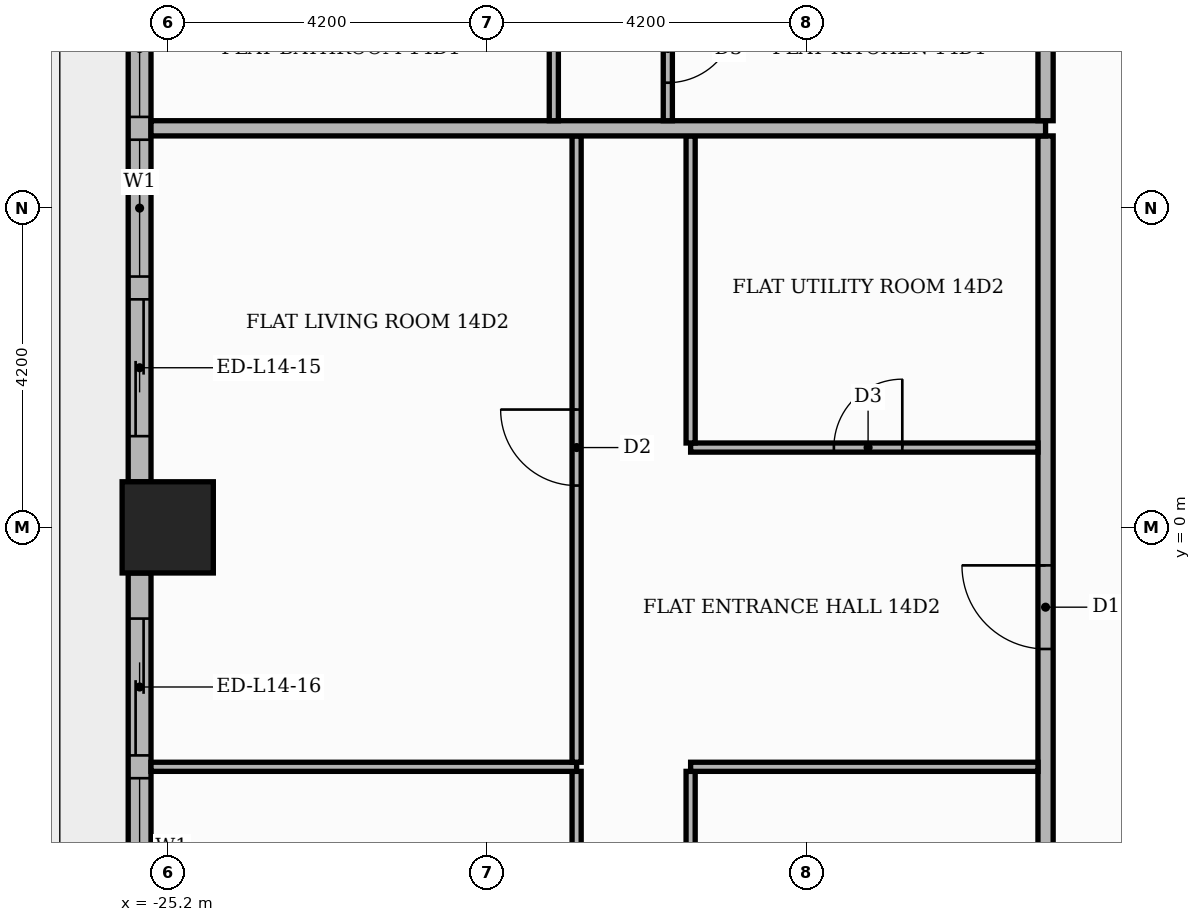
"""IFC4 building model, lengths in metres.
Left out: names, types, materials, properties, quantities, classifications, styles, units other than length and angle.
Written with IfcOpenShell. Run it as: python <this file> out.ifc"""

import sys

from ifc_helpers import new_model, si_unit, direction, frame, frame_2d, origin, origin_2d, place, context, subcontext, project, spatial, rectangle, extrude, element, fill, save


model = new_model("IFC4")
c1 = context("Model", 3, precision=1e-05, world=origin(), true_north=direction((0.0, 1.0)))
c2 = subcontext(c1, "Body", "Model", "MODEL_VIEW")
j1 = project(units=[si_unit("LENGTHUNIT", "METRE"), si_unit("PLANEANGLEUNIT", "RADIAN")], contexts=[c1])
p1 = place(None, origin())
s1 = spatial("IfcSite", under=j1, at=p1, CompositionType="ELEMENT")
p2 = place(p1, origin())
s2 = spatial("IfcBuilding", under=s1, at=p2, CompositionType="ELEMENT")
p3 = place(p2, frame((0.0, 0.0, 62.1)))
s3 = spatial("IfcBuildingStorey", under=s2, at=p3, CompositionType="ELEMENT", Elevation=62.1)
p4 = place(p3, frame((-25.2, 0.0, 0.0), z_axis=(0.0, 0.0, 1.0), x_axis=(1.0, 0.0, 0.0)))
e1 = element("IfcColumn", 1, at=p4, inside=s3, PredefinedType="COLUMN", context=c2, shape_type="SweptSolid", body=[
    extrude(rectangle(XDim=1.2, YDim=1.2, at=origin_2d()), origin(), (0.0, 0.0, 1.0), 3.9),
])
p5 = place(p3, frame((-25.57, 7.8, 0.0), z_axis=(0.0, 0.0, 1.0), x_axis=(0.0, -1.0, 0.0)))
e2 = element("IfcWall", 2, at=p5, inside=s3, PredefinedType="STANDARD", context=c2, shape_type="SweptSolid", body=[
    extrude(rectangle(XDim=7.2, YDim=0.3, at=frame_2d((3.6, 0.0))), origin(), (0.0, 0.0, 1.0), 3.48),
])
p6 = place(p5, frame((0.6, 0.0, 0.9)))
e3 = element("IfcOpeningElement", 3, at=p6, cuts=e2, PredefinedType="OPENING", context=c2, shape_type="SweptSolid", body=[
    extrude(rectangle(XDim=1.8, YDim=2.1, at=frame_2d((0.9, 1.05))), frame((0.0, 0.16, 0.0), z_axis=(0.0, -1.0, 0.0), x_axis=(1.0, 0.0, 0.0)), (0.0, 0.0, 1.0), 0.32),
])
p7 = place(p5, frame((2.7, 0.0, 0.9)))
e4 = element("IfcOpeningElement", 4, at=p7, cuts=e2, PredefinedType="OPENING", context=c2, shape_type="SweptSolid", body=[
    extrude(rectangle(XDim=1.8, YDim=2.1, at=frame_2d((0.9, 1.05))), frame((0.0, 0.16, 0.0), z_axis=(0.0, -1.0, 0.0), x_axis=(1.0, 0.0, 0.0)), (0.0, 0.0, 1.0), 0.32),
])
p8 = place(p5, frame((4.8, 0.0, 0.0)))
e5 = element("IfcOpeningElement", 5, at=p8, cuts=e2, PredefinedType="OPENING", context=c2, shape_type="SweptSolid", body=[
    extrude(rectangle(XDim=1.8, YDim=2.4, at=frame_2d((0.9, 1.2))), frame((0.0, 0.16, 0.0), z_axis=(0.0, -1.0, 0.0), x_axis=(1.0, 0.0, 0.0)), (0.0, 0.0, 1.0), 0.32),
])
p9 = place(p3, frame((-25.57, -0.6, 0.0), z_axis=(0.0, 0.0, 1.0), x_axis=(0.0, -1.0, 0.0)))
e6 = element("IfcWall", 6, at=p9, inside=s3, PredefinedType="STANDARD", context=c2, shape_type="SweptSolid", body=[
    extrude(rectangle(XDim=7.2, YDim=0.3, at=frame_2d((3.6, 0.0))), origin(), (0.0, 0.0, 1.0), 3.48),
])
p10 = place(p9, frame((0.6, 0.0, 0.0)))
e7 = element("IfcOpeningElement", 7, at=p10, cuts=e6, PredefinedType="OPENING", context=c2, shape_type="SweptSolid", body=[
    extrude(rectangle(XDim=1.8, YDim=2.4, at=frame_2d((0.9, 1.2))), frame((0.0, 0.16, 0.0), z_axis=(0.0, -1.0, 0.0), x_axis=(1.0, 0.0, 0.0)), (0.0, 0.0, 1.0), 0.32),
])
p11 = place(p9, frame((2.7, 0.0, 0.9)))
e8 = element("IfcOpeningElement", 8, at=p11, cuts=e6, PredefinedType="OPENING", context=c2, shape_type="SweptSolid", body=[
    extrude(rectangle(XDim=1.8, YDim=2.1, at=frame_2d((0.9, 1.05))), frame((0.0, 0.16, 0.0), z_axis=(0.0, -1.0, 0.0), x_axis=(1.0, 0.0, 0.0)), (0.0, 0.0, 1.0), 0.32),
])
p12 = place(p9, frame((4.8, 0.0, 0.0)))
e9 = element("IfcOpeningElement", 9, at=p12, cuts=e6, PredefinedType="OPENING", context=c2, shape_type="SweptSolid", body=[
    extrude(rectangle(XDim=1.8, YDim=2.4, at=frame_2d((0.9, 1.2))), frame((0.0, 0.16, 0.0), z_axis=(0.0, -1.0, 0.0), x_axis=(1.0, 0.0, 0.0)), (0.0, 0.0, 1.0), 0.32),
])
p13 = place(p3, frame((-13.65, -13.55, 0.0), z_axis=(0.0, 0.0, 1.0), x_axis=(0.0, 1.0, 0.0)))
e10 = element("IfcWall", 10, at=p13, inside=s3, PredefinedType="PARTITIONING", context=c2, shape_type="SweptSolid", body=[
    extrude(rectangle(XDim=18.7, YDim=0.2, at=frame_2d((9.35, 0.0))), origin(), (0.0, 0.0, 1.0), 3.48),
])
p14 = place(p13, frame((11.95, 0.0, 0.0)))
e11 = element("IfcOpeningElement", 11, at=p14, cuts=e10, PredefinedType="OPENING", context=c2, shape_type="SweptSolid", body=[
    extrude(rectangle(XDim=1.1, YDim=2.4, at=frame_2d((0.55, 1.2))), frame((0.0, 0.11, 0.0), z_axis=(0.0, -1.0, 0.0), x_axis=(1.0, 0.0, 0.0)), (0.0, 0.0, 1.0), 0.22),
])
p15 = place(p3, frame((-19.82, -9.39, 0.0), z_axis=(0.0, 0.0, 1.0), x_axis=(0.0, 1.0, 0.0)))
e12 = element("IfcWall", 12, at=p15, inside=s3, PredefinedType="PARTITIONING", context=c2, shape_type="SweptSolid", body=[
    extrude(rectangle(XDim=6.18, YDim=0.12, at=frame_2d((3.09, 0.0))), origin(), (0.0, 0.0, 1.0), 3.48),
])
p16 = place(p15, frame((2.64, 0.0, 0.0)))
e13 = element("IfcOpeningElement", 13, at=p16, cuts=e12, PredefinedType="OPENING", context=c2, shape_type="SweptSolid", body=[
    extrude(rectangle(XDim=0.9, YDim=2.1, at=frame_2d((0.45, 1.05))), frame((0.0, 0.07, 0.0), z_axis=(0.0, -1.0, 0.0), x_axis=(1.0, 0.0, 0.0)), (0.0, 0.0, 1.0), 0.14),
])
p17 = place(p3, frame((-18.32, -8.94, 0.0), z_axis=(0.0, 0.0, 1.0), x_axis=(0.0, 1.0, 0.0)))
e14 = element("IfcWall", 14, at=p17, inside=s3, PredefinedType="PARTITIONING", context=c2, shape_type="SweptSolid", body=[
    extrude(rectangle(XDim=5.73, YDim=0.12, at=frame_2d((2.865, 0.0))), origin(), (0.0, 0.0, 1.0), 3.48),
])
p18 = place(p17, frame((2.415, 0.0, 0.0)))
e15 = element("IfcOpeningElement", 15, at=p18, cuts=e14, PredefinedType="OPENING", context=c2, shape_type="SweptSolid", body=[
    extrude(rectangle(XDim=0.9, YDim=2.1, at=frame_2d((0.45, 1.05))), frame((0.0, 0.07, 0.0), z_axis=(0.0, -1.0, 0.0), x_axis=(1.0, 0.0, 0.0)), (0.0, 0.0, 1.0), 0.14),
])
p19 = place(p3, frame((-25.42, -3.15, 0.0), z_axis=(0.0, 0.0, 1.0), x_axis=(1.0, 0.0, 0.0)))
e16 = element("IfcWall", 16, at=p19, inside=s3, PredefinedType="PARTITIONING", context=c2, shape_type="SweptSolid", body=[
    extrude(rectangle(XDim=5.6, YDim=0.12, at=frame_2d((2.8, 0.0))), origin(), (0.0, 0.0, 1.0), 3.48),
])
p20 = place(p3, frame((-18.32, -3.15, 0.0), z_axis=(0.0, 0.0, 1.0), x_axis=(1.0, 0.0, 0.0)))
e17 = element("IfcWall", 17, at=p20, inside=s3, PredefinedType="PARTITIONING", context=c2, shape_type="SweptSolid", body=[
    extrude(rectangle(XDim=4.57, YDim=0.12, at=frame_2d((2.285, 0.0))), origin(), (0.0, 0.0, 1.0), 3.48),
])
p21 = place(p3, frame((-19.82, -3.09, 0.0), z_axis=(0.0, 0.0, 1.0), x_axis=(0.0, 1.0, 0.0)))
e18 = element("IfcWall", 18, at=p21, inside=s3, PredefinedType="PARTITIONING", context=c2, shape_type="SweptSolid", body=[
    extrude(rectangle(XDim=8.24, YDim=0.12, at=frame_2d((4.12, 0.0))), origin(), (0.0, 0.0, 1.0), 3.48),
])
p22 = place(p21, frame((3.64, 0.0, 0.0)))
e19 = element("IfcOpeningElement", 19, at=p22, cuts=e18, PredefinedType="OPENING", context=c2, shape_type="SweptSolid", body=[
    extrude(rectangle(XDim=1.0, YDim=2.1, at=frame_2d((0.5, 1.05))), frame((0.0, 0.07, 0.0), z_axis=(0.0, -1.0, 0.0), x_axis=(1.0, 0.0, 0.0)), (0.0, 0.0, 1.0), 0.14),
])
p23 = place(p3, frame((-18.32, 1.05, 0.0), z_axis=(0.0, 0.0, 1.0), x_axis=(1.0, 0.0, 0.0)))
e20 = element("IfcWall", 20, at=p23, inside=s3, PredefinedType="PARTITIONING", context=c2, shape_type="SweptSolid", body=[
    extrude(rectangle(XDim=4.57, YDim=0.12, at=frame_2d((2.285, 0.0))), origin(), (0.0, 0.0, 1.0), 3.48),
])
p24 = place(p23, frame((1.885, 0.0, 0.0)))
e21 = element("IfcOpeningElement", 21, at=p24, cuts=e20, PredefinedType="OPENING", context=c2, shape_type="SweptSolid", body=[
    extrude(rectangle(XDim=0.9, YDim=2.1, at=frame_2d((0.45, 1.05))), frame((0.0, 0.07, 0.0), z_axis=(0.0, -1.0, 0.0), x_axis=(1.0, 0.0, 0.0)), (0.0, 0.0, 1.0), 0.14),
])
p25 = place(p3, frame((-18.32, 1.11, 0.0), z_axis=(0.0, 0.0, 1.0), x_axis=(0.0, 1.0, 0.0)))
e22 = element("IfcWall", 22, at=p25, inside=s3, PredefinedType="PARTITIONING", context=c2, shape_type="SweptSolid", body=[
    extrude(rectangle(XDim=4.04, YDim=0.12, at=frame_2d((2.02, 0.0))), origin(), (0.0, 0.0, 1.0), 3.48),
])
p26 = place(p3, frame((-25.42, 5.25, 0.0), z_axis=(0.0, 0.0, 1.0), x_axis=(1.0, 0.0, 0.0)))
e23 = element("IfcWall", 23, at=p26, inside=s3, PredefinedType="PARTITIONING", context=c2, shape_type="SweptSolid", body=[
    extrude(rectangle(XDim=11.77, YDim=0.2, at=frame_2d((5.885, 0.0))), origin(), (0.0, 0.0, 1.0), 3.48),
])
p27 = place(p3, frame((-20.12, 5.35, 0.0), z_axis=(0.0, 0.0, 1.0), x_axis=(0.0, 1.0, 0.0)))
e24 = element("IfcWall", 24, at=p27, inside=s3, PredefinedType="PARTITIONING", context=c2, shape_type="SweptSolid", body=[
    extrude(rectangle(XDim=1.94, YDim=0.12, at=frame_2d((0.97, 0.0))), origin(), (0.0, 0.0, 1.0), 3.48),
])
p28 = place(p3, frame((-18.62, 5.35, 0.0), z_axis=(0.0, 0.0, 1.0), x_axis=(0.0, 1.0, 0.0)))
e25 = element("IfcWall", 25, at=p28, inside=s3, PredefinedType="PARTITIONING", context=c2, shape_type="SweptSolid", body=[
    extrude(rectangle(XDim=1.94, YDim=0.12, at=frame_2d((0.97, 0.0))), origin(), (0.0, 0.0, 1.0), 3.48),
])
p29 = place(p28, frame((0.5, 0.0, 0.0)))
e26 = element("IfcOpeningElement", 26, at=p29, cuts=e25, PredefinedType="OPENING", context=c2, shape_type="SweptSolid", body=[
    extrude(rectangle(XDim=0.9, YDim=2.1, at=frame_2d((0.45, 1.05))), frame((0.0, 0.07, 0.0), z_axis=(0.0, -1.0, 0.0), x_axis=(1.0, 0.0, 0.0)), (0.0, 0.0, 1.0), 0.14),
])
p30 = place(p3, frame((-13.65, 5.35, 0.0), z_axis=(0.0, 0.0, 1.0), x_axis=(0.0, 1.0, 0.0)))
e27 = element("IfcWall", 27, at=p30, inside=s3, PredefinedType="PARTITIONING", context=c2, shape_type="SweptSolid", body=[
    extrude(rectangle(XDim=8.2, YDim=0.2, at=frame_2d((4.1, 0.0))), origin(), (0.0, 0.0, 1.0), 3.48),
])
p31 = place(p30, frame((5.65, 0.0, 0.0)))
e28 = element("IfcOpeningElement", 28, at=p31, cuts=e27, PredefinedType="OPENING", context=c2, shape_type="SweptSolid", body=[
    extrude(rectangle(XDim=1.1, YDim=2.4, at=frame_2d((0.55, 1.2))), frame((0.0, 0.11, 0.0), z_axis=(0.0, -1.0, 0.0), x_axis=(1.0, 0.0, 0.0)), (0.0, 0.0, 1.0), 0.22),
])
p32 = place(p6, origin())
e29 = element("IfcWindow", 29, at=p32, inside=s3, PartitioningType="SINGLE_PANEL", PredefinedType="WINDOW", context=c2, shape_type="SweptSolid", body=[
    extrude(rectangle(XDim=1.8, YDim=2.1, at=frame_2d((0.9, 1.05))), frame((0.0, 0.03, 0.0), z_axis=(0.0, -1.0, 0.0), x_axis=(1.0, 0.0, 0.0)), (0.0, 0.0, 1.0), 0.06),
])
fill(e3, e29)
p33 = place(p7, origin())
e30 = element("IfcWindow", 30, at=p33, inside=s3, PartitioningType="SINGLE_PANEL", PredefinedType="WINDOW", context=c2, shape_type="SweptSolid", body=[
    extrude(rectangle(XDim=1.8, YDim=2.1, at=frame_2d((0.9, 1.05))), frame((0.0, 0.03, 0.0), z_axis=(0.0, -1.0, 0.0), x_axis=(1.0, 0.0, 0.0)), (0.0, 0.0, 1.0), 0.06),
])
fill(e4, e30)
p34 = place(p8, origin())
e31 = element("IfcDoor", 31, at=p34, inside=s3, OperationType="SLIDING_TO_RIGHT", PredefinedType="DOOR", context=c2, shape_type="SweptSolid", body=[
    extrude(rectangle(XDim=1.8, YDim=2.4, at=frame_2d((0.9, 1.2))), frame((0.0, 0.025, 0.0), z_axis=(0.0, -1.0, 0.0), x_axis=(1.0, 0.0, 0.0)), (0.0, 0.0, 1.0), 0.05),
])
fill(e5, e31)
p35 = place(p10, origin())
e32 = element("IfcDoor", 32, at=p35, inside=s3, OperationType="SLIDING_TO_LEFT", PredefinedType="DOOR", context=c2, shape_type="SweptSolid", body=[
    extrude(rectangle(XDim=1.8, YDim=2.4, at=frame_2d((0.9, 1.2))), frame((0.0, 0.025, 0.0), z_axis=(0.0, -1.0, 0.0), x_axis=(1.0, 0.0, 0.0)), (0.0, 0.0, 1.0), 0.05),
])
fill(e7, e32)
p36 = place(p11, origin())
e33 = element("IfcWindow", 33, at=p36, inside=s3, PartitioningType="SINGLE_PANEL", PredefinedType="WINDOW", context=c2, shape_type="SweptSolid", body=[
    extrude(rectangle(XDim=1.8, YDim=2.1, at=frame_2d((0.9, 1.05))), frame((0.0, 0.03, 0.0), z_axis=(0.0, -1.0, 0.0), x_axis=(1.0, 0.0, 0.0)), (0.0, 0.0, 1.0), 0.06),
])
fill(e8, e33)
p37 = place(p29, frame((0.9, 0.0, 0.0), z_axis=(0.0, 0.0, 1.0), x_axis=(-1.0, 0.0, 0.0)))
e34 = element("IfcDoor", 34, at=p37, inside=s3, OperationType="SINGLE_SWING_RIGHT", PredefinedType="DOOR", context=c2, shape_type="SweptSolid", body=[
    extrude(rectangle(XDim=0.9, YDim=2.1, at=frame_2d((0.45, 1.05))), frame((0.0, 0.025, 0.0), z_axis=(0.0, -1.0, 0.0), x_axis=(1.0, 0.0, 0.0)), (0.0, 0.0, 1.0), 0.05),
])
fill(e26, e34)
p38 = place(p14, origin())
e35 = element("IfcDoor", 35, at=p38, inside=s3, OperationType="SINGLE_SWING_RIGHT", PredefinedType="DOOR", context=c2, shape_type="SweptSolid", body=[
    extrude(rectangle(XDim=1.1, YDim=2.4, at=frame_2d((0.55, 1.2))), frame((0.0, 0.025, 0.0), z_axis=(0.0, -1.0, 0.0), x_axis=(1.0, 0.0, 0.0)), (0.0, 0.0, 1.0), 0.05),
])
fill(e11, e35)
p39 = place(p24, origin())
e36 = element("IfcDoor", 36, at=p39, inside=s3, OperationType="SINGLE_SWING_RIGHT", PredefinedType="DOOR", context=c2, shape_type="SweptSolid", body=[
    extrude(rectangle(XDim=0.9, YDim=2.1, at=frame_2d((0.45, 1.05))), frame((0.0, 0.025, 0.0), z_axis=(0.0, -1.0, 0.0), x_axis=(1.0, 0.0, 0.0)), (0.0, 0.0, 1.0), 0.05),
])
fill(e21, e36)
p40 = place(p22, origin())
e37 = element("IfcDoor", 37, at=p40, inside=s3, OperationType="SINGLE_SWING_RIGHT", PredefinedType="DOOR", context=c2, shape_type="SweptSolid", body=[
    extrude(rectangle(XDim=1.0, YDim=2.1, at=frame_2d((0.5, 1.05))), frame((0.0, 0.025, 0.0), z_axis=(0.0, -1.0, 0.0), x_axis=(1.0, 0.0, 0.0)), (0.0, 0.0, 1.0), 0.05),
])
fill(e19, e37)
save(model, sys.argv[1])
